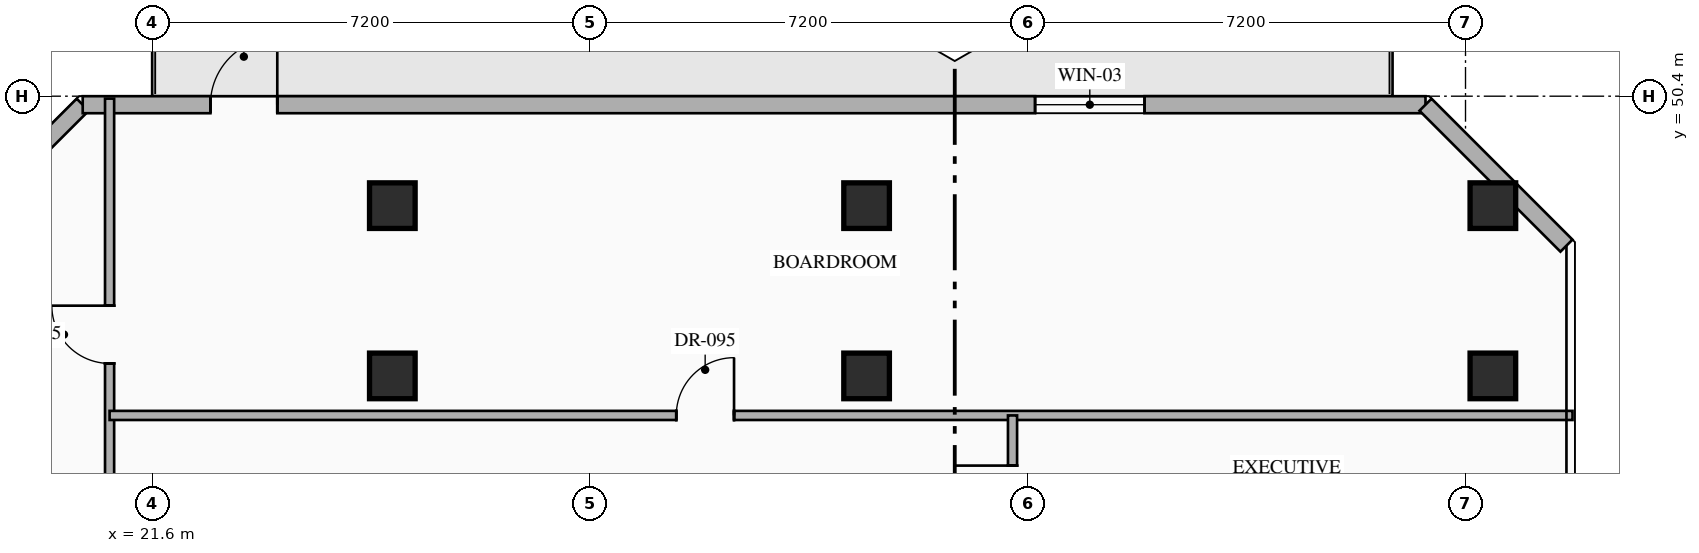
"""IFC4 building model, lengths in metres.
Left out: names, types, materials, properties, quantities, classifications, styles, units other than length and angle.
Written with IfcOpenShell. Run it as: python <this file> out.ifc"""

import sys

from ifc_helpers import new_model, si_unit, direction, frame, frame_2d, origin, origin_2d, place, context, subcontext, project, spatial, rectangle, hollow_rectangle, extrude, element, fill, save


model = new_model("IFC4")
c1 = context("Model", 3, precision=1e-05, world=origin(), true_north=direction((0.0, 1.0)))
c2 = subcontext(c1, "Body", "Model", "MODEL_VIEW")
j1 = project(units=[si_unit("LENGTHUNIT", "METRE"), si_unit("PLANEANGLEUNIT", "RADIAN")], contexts=[c1])
p1 = place(None, origin())
s1 = spatial("IfcSite", under=j1, at=p1, CompositionType="ELEMENT")
p2 = place(p1, origin())
s2 = spatial("IfcBuilding", under=s1, at=p2, CompositionType="ELEMENT")
p3 = place(p2, frame((0.0, 0.0, 198.75)))
s3 = spatial("IfcBuildingStorey", under=s2, at=p3, CompositionType="ELEMENT", Elevation=198.75)
for number, where, z_axis, x_axis in (
    (1, (25.55, 45.8, 0.0), (0.0, 0.0, 1.0), (1.0, 0.0, 0.0)),
    (2, (33.35, 45.8, 0.0), (0.0, 0.0, 1.0), (1.0, 0.0, 0.0)),
    (3, (43.65, 45.8, 0.0), (0.0, 0.0, 1.0), (1.0, 0.0, 0.0)),
    (4, (25.55, 48.6, 0.0), (0.0, 0.0, 1.0), (1.0, 0.0, 0.0)),
    (5, (33.35, 48.6, 0.0), (0.0, 0.0, 1.0), (1.0, 0.0, 0.0)),
    (6, (43.65, 48.6, 0.0), (0.0, 0.0, 1.0), (1.0, 0.0, 0.0)),
):
    element("IfcColumn", number, at=place(p3, frame(where, z_axis=z_axis, x_axis=x_axis)), inside=s3, PredefinedType="COLUMN", context=c2, shape_type="SweptSolid", body=[
        extrude(hollow_rectangle(XDim=0.75, YDim=0.75, WallThickness=0.028, at=origin_2d()), origin(), (0.0, 0.0, 1.0), 3.6),
    ])
p4 = place(p3, frame((18.14, 47.942, 0.0), z_axis=(0.0, 0.0, 1.0), x_axis=(0.707106781187, 0.707106781187, 0.0)))
e7 = element("IfcWall", 7, at=p4, inside=s3, PredefinedType="STANDARD", context=c2, shape_type="SweptSolid", body=[
    extrude(rectangle(XDim=3.278, YDim=0.28, at=frame_2d((1.639, 0.0))), origin(), (0.0, 0.0, 1.0), 3.35),
])
p5 = place(p3, frame((20.458, 50.26, 0.0), z_axis=(0.0, 0.0, 1.0), x_axis=(1.0, 0.0, 0.0)))
e8 = element("IfcWall", 8, at=p5, inside=s3, PredefinedType="STANDARD", context=c2, shape_type="SweptSolid", body=[
    extrude(rectangle(XDim=22.084, YDim=0.28, at=frame_2d((11.042, 0.0))), origin(), (0.0, 0.0, 1.0), 3.35),
])
p6 = place(p5, frame((2.1, 0.0, 0.0)))
e9 = element("IfcOpeningElement", 9, at=p6, cuts=e8, PredefinedType="OPENING", context=c2, shape_type="SweptSolid", body=[
    extrude(rectangle(XDim=1.1, YDim=2.2, at=frame_2d((0.55, 1.1))), frame((0.0, 0.15, 0.0), z_axis=(0.0, -1.0, 0.0), x_axis=(1.0, 0.0, 0.0)), (0.0, 0.0, 1.0), 0.3),
])
p7 = place(p5, frame((15.663, 0.0, 0.85)))
e10 = element("IfcOpeningElement", 10, at=p7, cuts=e8, PredefinedType="OPENING", context=c2, shape_type="SweptSolid", body=[
    extrude(rectangle(XDim=1.8, YDim=2.1, at=frame_2d((0.9, 1.05))), frame((0.0, 0.15, 0.0), z_axis=(0.0, -1.0, 0.0), x_axis=(1.0, 0.0, 0.0)), (0.0, 0.0, 1.0), 0.3),
])
p8 = place(p3, frame((42.542, 50.26, 0.0), z_axis=(0.0, 0.0, 1.0), x_axis=(0.707106781187, -0.707106781187, 0.0)))
e11 = element("IfcWall", 11, at=p8, inside=s3, PredefinedType="STANDARD", context=c2, shape_type="SweptSolid", body=[
    extrude(rectangle(XDim=3.278, YDim=0.28, at=frame_2d((1.639, 0.0))), origin(), (0.0, 0.0, 1.0), 3.35),
])
p9 = place(p3, frame((20.9, 42.6, 0.0), z_axis=(0.0, 0.0, 1.0), x_axis=(0.0, 1.0, 0.0)))
e12 = element("IfcWall", 12, at=p9, inside=s3, PredefinedType="PARTITIONING", context=c2, shape_type="SweptSolid", body=[
    extrude(rectangle(XDim=7.76, YDim=0.15, at=frame_2d((3.88, 0.0))), origin(), (0.0, 0.0, 1.0), 3.35),
])
p10 = place(p9, frame((3.405, 0.0, 0.0)))
e13 = element("IfcOpeningElement", 13, at=p10, cuts=e12, PredefinedType="OPENING", context=c2, shape_type="SweptSolid", body=[
    extrude(rectangle(XDim=0.95, YDim=2.15, at=frame_2d((0.475, 1.075))), frame((0.0, 0.085, 0.0), z_axis=(0.0, -1.0, 0.0), x_axis=(1.0, 0.0, 0.0)), (0.0, 0.0, 1.0), 0.17),
])
p11 = place(p3, frame((20.9, 45.15, 0.0), z_axis=(0.0, 0.0, 1.0), x_axis=(1.0, 0.0, 0.0)))
e14 = element("IfcWall", 14, at=p11, inside=s3, PredefinedType="PARTITIONING", context=c2, shape_type="SweptSolid", body=[
    extrude(rectangle(XDim=24.06, YDim=0.15, at=frame_2d((12.03, 0.0))), origin(), (0.0, 0.0, 1.0), 3.35),
])
p12 = place(p11, frame((9.32, 0.0, 0.0)))
e15 = element("IfcOpeningElement", 15, at=p12, cuts=e14, PredefinedType="OPENING", context=c2, shape_type="SweptSolid", body=[
    extrude(rectangle(XDim=0.95, YDim=2.15, at=frame_2d((0.475, 1.075))), frame((0.0, 0.085, 0.0), z_axis=(0.0, -1.0, 0.0), x_axis=(1.0, 0.0, 0.0)), (0.0, 0.0, 1.0), 0.17),
])
p13 = place(p3, frame((35.75, 42.55, 0.0), z_axis=(0.0, 0.0, 1.0), x_axis=(0.0, 1.0, 0.0)))
e16 = element("IfcWall", 16, at=p13, inside=s3, PredefinedType="PARTITIONING", context=c2, shape_type="SweptSolid", body=[
    extrude(rectangle(XDim=2.6, YDim=0.15, at=frame_2d((1.3, 0.0))), origin(), (0.0, 0.0, 1.0), 3.35),
])
p14 = place(p13, frame((0.825, 0.0, 0.0)))
e17 = element("IfcOpeningElement", 17, at=p14, cuts=e16, PredefinedType="OPENING", context=c2, shape_type="SweptSolid", body=[
    extrude(rectangle(XDim=0.95, YDim=2.15, at=frame_2d((0.475, 1.075))), frame((0.0, 0.085, 0.0), z_axis=(0.0, -1.0, 0.0), x_axis=(1.0, 0.0, 0.0)), (0.0, 0.0, 1.0), 0.17),
])
p15 = place(p6, origin())
e18 = element("IfcDoor", 18, at=p15, inside=s3, OperationType="SINGLE_SWING_RIGHT", PredefinedType="DOOR", context=c2, shape_type="SweptSolid", body=[
    extrude(rectangle(XDim=1.1, YDim=2.2, at=frame_2d((0.55, 1.1))), frame((0.0, 0.025, 0.0), z_axis=(0.0, -1.0, 0.0), x_axis=(1.0, 0.0, 0.0)), (0.0, 0.0, 1.0), 0.05),
])
fill(e9, e18)
p16 = place(p7, origin())
e19 = element("IfcWindow", 19, at=p16, inside=s3, PartitioningType="SINGLE_PANEL", PredefinedType="WINDOW", context=c2, shape_type="SweptSolid", body=[
    extrude(rectangle(XDim=1.8, YDim=2.1, at=frame_2d((0.9, 1.05))), frame((0.0, 0.03, 0.0), z_axis=(0.0, -1.0, 0.0), x_axis=(1.0, 0.0, 0.0)), (0.0, 0.0, 1.0), 0.06),
])
fill(e10, e19)
p17 = place(p10, origin())
e20 = element("IfcDoor", 20, at=p17, inside=s3, OperationType="SINGLE_SWING_RIGHT", PredefinedType="DOOR", context=c2, shape_type="SweptSolid", body=[
    extrude(rectangle(XDim=0.95, YDim=2.15, at=frame_2d((0.475, 1.075))), frame((0.0, 0.025, 0.0), z_axis=(0.0, -1.0, 0.0), x_axis=(1.0, 0.0, 0.0)), (0.0, 0.0, 1.0), 0.05),
])
fill(e13, e20)
p18 = place(p12, origin())
e21 = element("IfcDoor", 21, at=p18, inside=s3, OperationType="SINGLE_SWING_RIGHT", PredefinedType="DOOR", context=c2, shape_type="SweptSolid", body=[
    extrude(rectangle(XDim=0.95, YDim=2.15, at=frame_2d((0.475, 1.075))), frame((0.0, 0.025, 0.0), z_axis=(0.0, -1.0, 0.0), x_axis=(1.0, 0.0, 0.0)), (0.0, 0.0, 1.0), 0.05),
])
fill(e15, e21)
p19 = place(p14, origin())
e22 = element("IfcDoor", 22, at=p19, inside=s3, OperationType="SINGLE_SWING_RIGHT", PredefinedType="DOOR", context=c2, shape_type="SweptSolid", body=[
    extrude(rectangle(XDim=0.95, YDim=2.15, at=frame_2d((0.475, 1.075))), frame((0.0, 0.025, 0.0), z_axis=(0.0, -1.0, 0.0), x_axis=(1.0, 0.0, 0.0)), (0.0, 0.0, 1.0), 0.05),
])
fill(e17, e22)
save(model, sys.argv[1])
